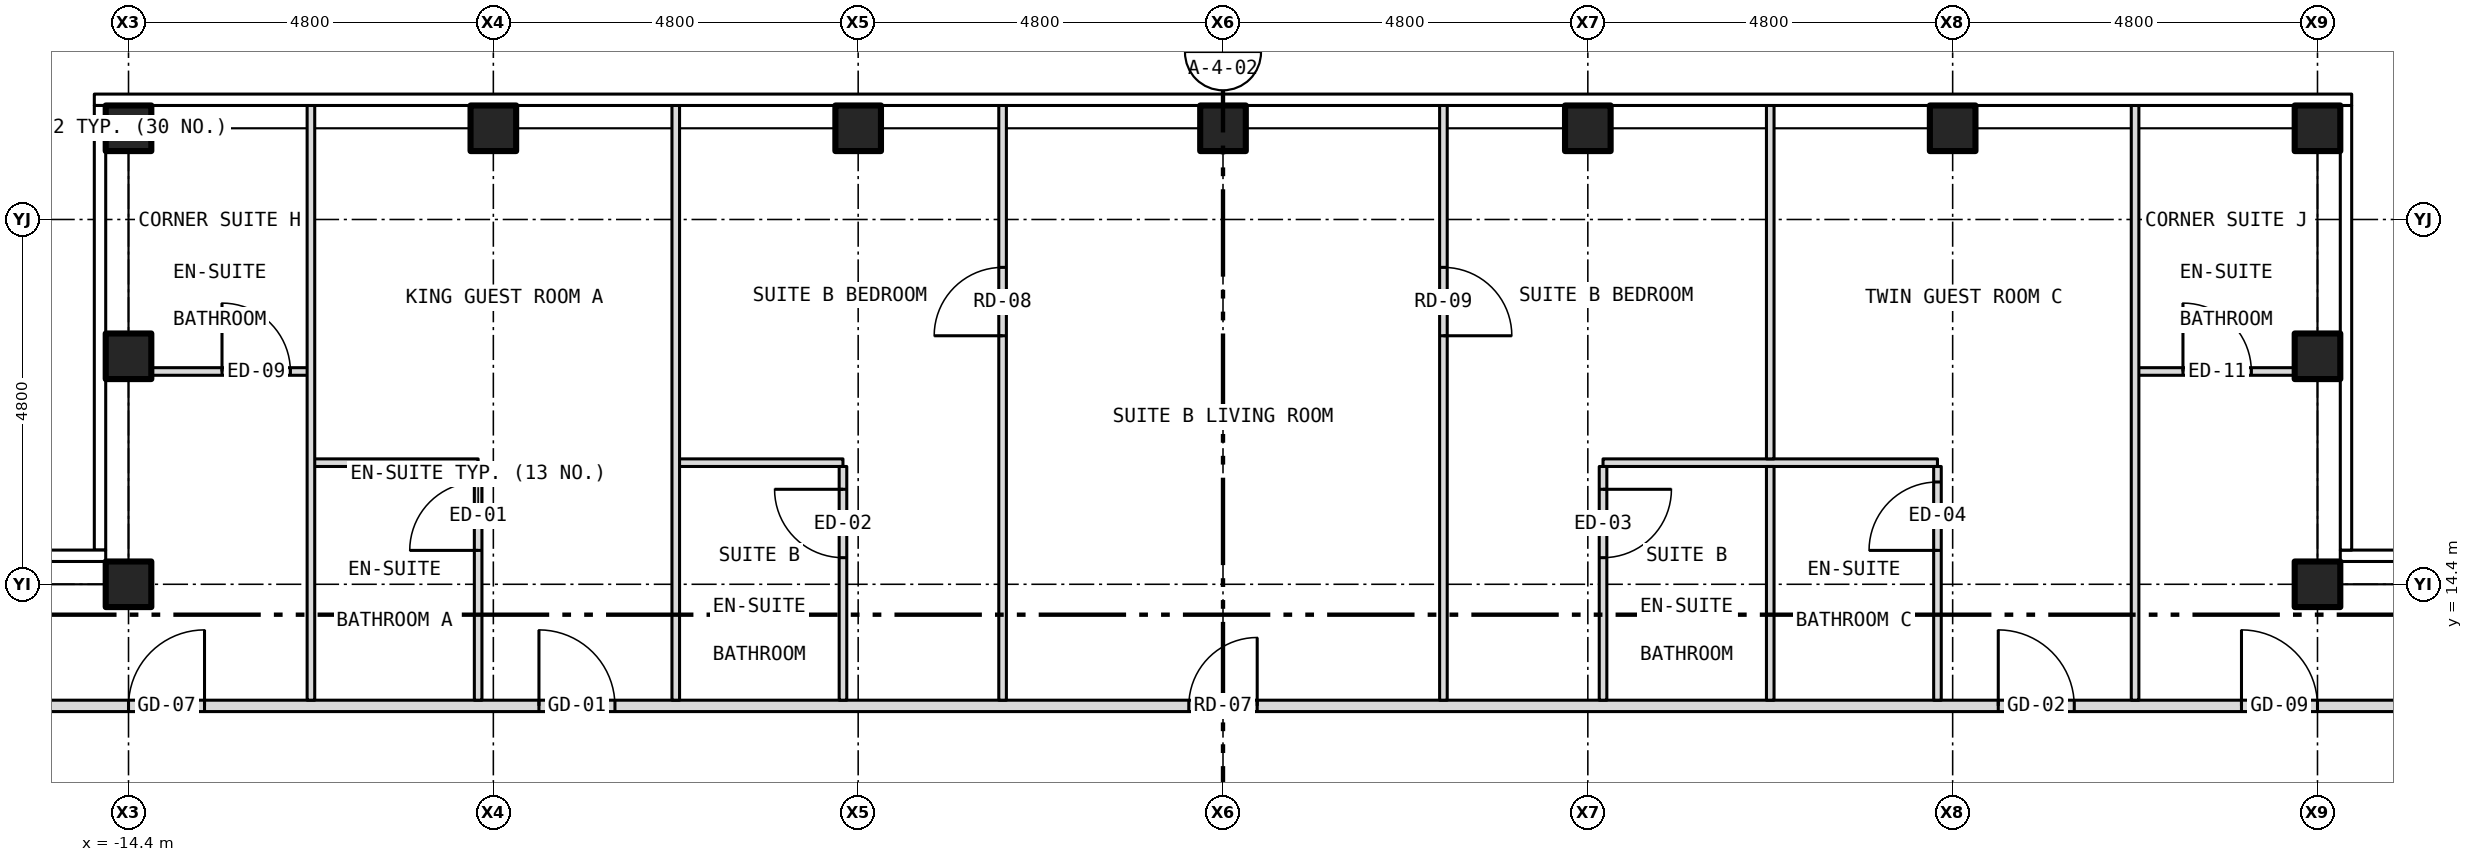
"""IFC4 building model, lengths in metres.
Left out: names, types, materials, properties, quantities, classifications, styles, units other than length and angle.
Written with IfcOpenShell. Run it as: python <this file> out.ifc"""

import sys

from ifc_helpers import new_model, si_unit, direction, frame, frame_2d, origin, origin_2d, place, context, subcontext, project, spatial, rectangle, hollow_rectangle, extrude, element, fill, save


model = new_model("IFC4")
c1 = context("Model", 3, precision=1e-05, world=origin(), true_north=direction((0.0, 1.0)))
c2 = subcontext(c1, "Body", "Model", "MODEL_VIEW")
j1 = project(units=[si_unit("LENGTHUNIT", "METRE"), si_unit("PLANEANGLEUNIT", "RADIAN")], contexts=[c1])
p1 = place(None, origin())
s1 = spatial("IfcSite", under=j1, at=p1, CompositionType="ELEMENT")
p2 = place(p1, origin())
s2 = spatial("IfcBuilding", under=s1, at=p2, CompositionType="ELEMENT")
p3 = place(p2, frame((0.0, 0.0, 248.0)))
s3 = spatial("IfcBuildingStorey", under=s2, at=p3, CompositionType="ELEMENT", Elevation=248.0)
for number, where, z_axis, x_axis in (
    (1, (-14.4, 20.4, -0.15), (0.0, 0.0, 1.0), (1.0, 0.0, 0.0)),
    (2, (-9.6, 20.4, -0.15), (0.0, 0.0, 1.0), (1.0, 0.0, 0.0)),
    (3, (-4.8, 20.4, -0.15), (0.0, 0.0, 1.0), (1.0, 0.0, 0.0)),
    (4, (0.0, 20.4, -0.15), (0.0, 0.0, 1.0), (1.0, 0.0, 0.0)),
    (5, (4.8, 20.4, -0.15), (0.0, 0.0, 1.0), (1.0, 0.0, 0.0)),
    (6, (9.6, 20.4, -0.15), (0.0, 0.0, 1.0), (1.0, 0.0, 0.0)),
    (7, (14.4, 20.4, -0.15), (0.0, 0.0, 1.0), (1.0, 0.0, 0.0)),
    (8, (-14.4, 14.4, -0.15), (0.0, 0.0, 1.0), (1.0, 0.0, 0.0)),
    (9, (-14.4, 17.4, -0.15), (0.0, 0.0, 1.0), (1.0, 0.0, 0.0)),
    (10, (14.4, 14.4, -0.15), (0.0, 0.0, 1.0), (1.0, 0.0, 0.0)),
    (11, (14.4, 17.4, -0.15), (0.0, 0.0, 1.0), (1.0, 0.0, 0.0)),
):
    element("IfcColumn", number, at=place(p3, frame(where, z_axis=z_axis, x_axis=x_axis)), inside=s3, PredefinedType="COLUMN", context=c2, shape_type="SweptSolid", body=[
        extrude(hollow_rectangle(XDim=0.6, YDim=0.6, WallThickness=0.03, at=origin_2d()), origin(), (0.0, 0.0, 1.0), 3.5),
    ])
p4 = place(p3, frame((-15.8, 12.8, 0.0), z_axis=(0.0, 0.0, 1.0), x_axis=(1.0, 0.0, 0.0)))
e12 = element("IfcWall", 12, at=p4, inside=s3, PredefinedType="PARTITIONING", context=c2, shape_type="SweptSolid", body=[
    extrude(rectangle(XDim=31.6, YDim=0.15, at=frame_2d((15.8, 0.0))), origin(), (0.0, 0.0, 1.0), 3.35),
])
p5 = place(p4, frame((6.8, 0.0, 0.0)))
e13 = element("IfcOpeningElement", 13, at=p5, cuts=e12, PredefinedType="OPENING", context=c2, shape_type="SweptSolid", body=[
    extrude(rectangle(XDim=1.0, YDim=2.1, at=frame_2d((0.5, 1.05))), frame((0.0, 0.087, 0.0), z_axis=(0.0, -1.0, 0.0), x_axis=(1.0, 0.0, 0.0)), (0.0, 0.0, 1.0), 0.174),
])
p6 = place(p4, frame((15.35, 0.0, 0.0)))
e14 = element("IfcOpeningElement", 14, at=p6, cuts=e12, PredefinedType="OPENING", context=c2, shape_type="SweptSolid", body=[
    extrude(rectangle(XDim=0.9, YDim=2.1, at=frame_2d((0.45, 1.05))), frame((0.0, 0.087, 0.0), z_axis=(0.0, -1.0, 0.0), x_axis=(1.0, 0.0, 0.0)), (0.0, 0.0, 1.0), 0.174),
])
p7 = place(p4, frame((26.0, 0.0, 0.0)))
e15 = element("IfcOpeningElement", 15, at=p7, cuts=e12, PredefinedType="OPENING", context=c2, shape_type="SweptSolid", body=[
    extrude(rectangle(XDim=1.0, YDim=2.1, at=frame_2d((0.5, 1.05))), frame((0.0, 0.087, 0.0), z_axis=(0.0, -1.0, 0.0), x_axis=(1.0, 0.0, 0.0)), (0.0, 0.0, 1.0), 0.174),
])
p8 = place(p4, frame((1.4, 0.0, 0.0)))
e16 = element("IfcOpeningElement", 16, at=p8, cuts=e12, PredefinedType="OPENING", context=c2, shape_type="SweptSolid", body=[
    extrude(rectangle(XDim=1.0, YDim=2.1, at=frame_2d((0.5, 1.05))), frame((0.0, 0.087, 0.0), z_axis=(0.0, -1.0, 0.0), x_axis=(1.0, 0.0, 0.0)), (0.0, 0.0, 1.0), 0.174),
])
p9 = place(p4, frame((29.2, 0.0, 0.0)))
e17 = element("IfcOpeningElement", 17, at=p9, cuts=e12, PredefinedType="OPENING", context=c2, shape_type="SweptSolid", body=[
    extrude(rectangle(XDim=1.0, YDim=2.1, at=frame_2d((0.5, 1.05))), frame((0.0, 0.087, 0.0), z_axis=(0.0, -1.0, 0.0), x_axis=(1.0, 0.0, 0.0)), (0.0, 0.0, 1.0), 0.174),
])
for number, where, z_axis, x_axis in (
    (18, (-12.0, 16.0, 0.0), (0.0, 0.0, 1.0), (1.0, 0.0, 0.0)),
    (19, (-7.2, 16.0, 0.0), (0.0, 0.0, 1.0), (1.0, 0.0, 0.0)),
):
    element("IfcWall", number, at=place(p3, frame(where, z_axis=z_axis, x_axis=x_axis)), inside=s3, PredefinedType="PARTITIONING", context=c2, shape_type="SweptSolid", body=[
        extrude(rectangle(XDim=2.2, YDim=0.1, at=frame_2d((1.1, 0.0))), origin(), (0.0, 0.0, 1.0), 3.35),
    ])
p10 = place(p3, frame((5.0, 16.0, 0.0), z_axis=(0.0, 0.0, 1.0), x_axis=(1.0, 0.0, 0.0)))
e20 = element("IfcWall", 20, at=p10, inside=s3, PredefinedType="PARTITIONING", context=c2, shape_type="SweptSolid", body=[
    extrude(rectangle(XDim=4.4, YDim=0.1, at=frame_2d((2.2, 0.0))), origin(), (0.0, 0.0, 1.0), 3.35),
])
p11 = place(p3, frame((-14.28, 17.2, 0.0), z_axis=(0.0, 0.0, 1.0), x_axis=(1.0, 0.0, 0.0)))
e21 = element("IfcWall", 21, at=p11, inside=s3, PredefinedType="PARTITIONING", context=c2, shape_type="SweptSolid", body=[
    extrude(rectangle(XDim=2.28, YDim=0.1, at=frame_2d((1.14, 0.0))), origin(), (0.0, 0.0, 1.0), 3.35),
])
p12 = place(p11, frame((1.11, 0.0, 0.0)))
e22 = element("IfcOpeningElement", 22, at=p12, cuts=e21, PredefinedType="OPENING", context=c2, shape_type="SweptSolid", body=[
    extrude(rectangle(XDim=0.9, YDim=2.1, at=frame_2d((0.45, 1.05))), frame((0.0, 0.062, 0.0), z_axis=(0.0, -1.0, 0.0), x_axis=(1.0, 0.0, 0.0)), (0.0, 0.0, 1.0), 0.124),
])
p13 = place(p3, frame((12.0, 17.2, 0.0), z_axis=(0.0, 0.0, 1.0), x_axis=(1.0, 0.0, 0.0)))
e23 = element("IfcWall", 23, at=p13, inside=s3, PredefinedType="PARTITIONING", context=c2, shape_type="SweptSolid", body=[
    extrude(rectangle(XDim=2.28, YDim=0.1, at=frame_2d((1.14, 0.0))), origin(), (0.0, 0.0, 1.0), 3.35),
])
p14 = place(p13, frame((0.63, 0.0, 0.0)))
e24 = element("IfcOpeningElement", 24, at=p14, cuts=e23, PredefinedType="OPENING", context=c2, shape_type="SweptSolid", body=[
    extrude(rectangle(XDim=0.9, YDim=2.1, at=frame_2d((0.45, 1.05))), frame((0.0, 0.062, 0.0), z_axis=(0.0, -1.0, 0.0), x_axis=(1.0, 0.0, 0.0)), (0.0, 0.0, 1.0), 0.124),
])
p15 = place(p3, frame((-12.0, 12.875, 0.0), z_axis=(0.0, 0.0, 1.0), x_axis=(0.0, 1.0, 0.0)))
e25 = element("IfcWall", 25, at=p15, inside=s3, PredefinedType="PARTITIONING", context=c2, shape_type="SweptSolid", body=[
    extrude(rectangle(XDim=7.855, YDim=0.1, at=frame_2d((3.927, 0.0))), origin(), (0.0, 0.0, 1.0), 3.35),
])
p16 = place(p3, frame((-9.8, 12.875, 0.0), z_axis=(0.0, 0.0, 1.0), x_axis=(0.0, 1.0, 0.0)))
e26 = element("IfcWall", 26, at=p16, inside=s3, PredefinedType="PARTITIONING", context=c2, shape_type="SweptSolid", body=[
    extrude(rectangle(XDim=3.075, YDim=0.1, at=frame_2d((1.538, 0.0))), origin(), (0.0, 0.0, 1.0), 2.728),
])
p17 = place(p16, frame((1.971, 0.0, 0.0)))
e27 = element("IfcOpeningElement", 27, at=p17, cuts=e26, PredefinedType="OPENING", context=c2, shape_type="SweptSolid", body=[
    extrude(rectangle(XDim=0.9, YDim=2.1, at=frame_2d((0.45, 1.05))), frame((0.0, 0.062, 0.0), z_axis=(0.0, -1.0, 0.0), x_axis=(1.0, 0.0, 0.0)), (0.0, 0.0, 1.0), 0.124),
])
p18 = place(p3, frame((-7.2, 12.875, 0.0), z_axis=(0.0, 0.0, 1.0), x_axis=(0.0, 1.0, 0.0)))
e28 = element("IfcWall", 28, at=p18, inside=s3, PredefinedType="PARTITIONING", context=c2, shape_type="SweptSolid", body=[
    extrude(rectangle(XDim=7.855, YDim=0.1, at=frame_2d((3.927, 0.0))), origin(), (0.0, 0.0, 1.0), 3.35),
])
p19 = place(p3, frame((-5.0, 12.875, 0.0), z_axis=(0.0, 0.0, 1.0), x_axis=(0.0, 1.0, 0.0)))
e29 = element("IfcWall", 29, at=p19, inside=s3, PredefinedType="PARTITIONING", context=c2, shape_type="SweptSolid", body=[
    extrude(rectangle(XDim=3.075, YDim=0.1, at=frame_2d((1.538, 0.0))), origin(), (0.0, 0.0, 1.0), 3.35),
])
p20 = place(p19, frame((1.875, 0.0, 0.0)))
e30 = element("IfcOpeningElement", 30, at=p20, cuts=e29, PredefinedType="OPENING", context=c2, shape_type="SweptSolid", body=[
    extrude(rectangle(XDim=0.9, YDim=2.1, at=frame_2d((0.45, 1.05))), frame((0.0, 0.062, 0.0), z_axis=(0.0, -1.0, 0.0), x_axis=(1.0, 0.0, 0.0)), (0.0, 0.0, 1.0), 0.124),
])
p21 = place(p3, frame((-2.9, 12.875, 0.0), z_axis=(0.0, 0.0, 1.0), x_axis=(0.0, 1.0, 0.0)))
e31 = element("IfcWall", 31, at=p21, inside=s3, PredefinedType="PARTITIONING", context=c2, shape_type="SweptSolid", body=[
    extrude(rectangle(XDim=7.855, YDim=0.1, at=frame_2d((3.927, 0.0))), origin(), (0.0, 0.0, 1.0), 3.35),
])
p22 = place(p21, frame((4.795, 0.0, 0.0)))
e32 = element("IfcOpeningElement", 32, at=p22, cuts=e31, PredefinedType="OPENING", context=c2, shape_type="SweptSolid", body=[
    extrude(rectangle(XDim=0.9, YDim=2.1, at=frame_2d((0.45, 1.05))), frame((0.0, 0.062, 0.0), z_axis=(0.0, -1.0, 0.0), x_axis=(1.0, 0.0, 0.0)), (0.0, 0.0, 1.0), 0.124),
])
p23 = place(p3, frame((2.9, 12.875, 0.0), z_axis=(0.0, 0.0, 1.0), x_axis=(0.0, 1.0, 0.0)))
e33 = element("IfcWall", 33, at=p23, inside=s3, PredefinedType="PARTITIONING", context=c2, shape_type="SweptSolid", body=[
    extrude(rectangle(XDim=7.855, YDim=0.1, at=frame_2d((3.927, 0.0))), origin(), (0.0, 0.0, 1.0), 3.35),
])
p24 = place(p23, frame((4.795, 0.0, 0.0)))
e34 = element("IfcOpeningElement", 34, at=p24, cuts=e33, PredefinedType="OPENING", context=c2, shape_type="SweptSolid", body=[
    extrude(rectangle(XDim=0.9, YDim=2.1, at=frame_2d((0.45, 1.05))), frame((0.0, 0.062, 0.0), z_axis=(0.0, -1.0, 0.0), x_axis=(1.0, 0.0, 0.0)), (0.0, 0.0, 1.0), 0.124),
])
p25 = place(p3, frame((5.0, 12.875, 0.0), z_axis=(0.0, 0.0, 1.0), x_axis=(0.0, 1.0, 0.0)))
e35 = element("IfcWall", 35, at=p25, inside=s3, PredefinedType="PARTITIONING", context=c2, shape_type="SweptSolid", body=[
    extrude(rectangle(XDim=3.075, YDim=0.1, at=frame_2d((1.538, 0.0))), origin(), (0.0, 0.0, 1.0), 3.35),
])
p26 = place(p25, frame((1.875, 0.0, 0.0)))
e36 = element("IfcOpeningElement", 36, at=p26, cuts=e35, PredefinedType="OPENING", context=c2, shape_type="SweptSolid", body=[
    extrude(rectangle(XDim=0.9, YDim=2.1, at=frame_2d((0.45, 1.05))), frame((0.0, 0.062, 0.0), z_axis=(0.0, -1.0, 0.0), x_axis=(1.0, 0.0, 0.0)), (0.0, 0.0, 1.0), 0.124),
])
p27 = place(p3, frame((7.2, 12.875, 0.0), z_axis=(0.0, 0.0, 1.0), x_axis=(0.0, 1.0, 0.0)))
e37 = element("IfcWall", 37, at=p27, inside=s3, PredefinedType="PARTITIONING", context=c2, shape_type="SweptSolid", body=[
    extrude(rectangle(XDim=3.075, YDim=0.1, at=frame_2d((1.538, 0.0))), origin(), (0.0, 0.0, 1.0), 3.35),
])
p28 = place(p3, frame((7.2, 16.05, 0.0), z_axis=(0.0, 0.0, 1.0), x_axis=(0.0, 1.0, 0.0)))
e38 = element("IfcWall", 38, at=p28, inside=s3, PredefinedType="PARTITIONING", context=c2, shape_type="SweptSolid", body=[
    extrude(rectangle(XDim=4.68, YDim=0.1, at=frame_2d((2.34, 0.0))), origin(), (0.0, 0.0, 1.0), 3.35),
])
p29 = place(p3, frame((9.4, 12.875, 0.0), z_axis=(0.0, 0.0, 1.0), x_axis=(0.0, 1.0, 0.0)))
e39 = element("IfcWall", 39, at=p29, inside=s3, PredefinedType="PARTITIONING", context=c2, shape_type="SweptSolid", body=[
    extrude(rectangle(XDim=3.075, YDim=0.1, at=frame_2d((1.538, 0.0))), origin(), (0.0, 0.0, 1.0), 2.728),
])
p30 = place(p29, frame((1.971, 0.0, 0.0)))
e40 = element("IfcOpeningElement", 40, at=p30, cuts=e39, PredefinedType="OPENING", context=c2, shape_type="SweptSolid", body=[
    extrude(rectangle(XDim=0.9, YDim=2.1, at=frame_2d((0.45, 1.05))), frame((0.0, 0.062, 0.0), z_axis=(0.0, -1.0, 0.0), x_axis=(1.0, 0.0, 0.0)), (0.0, 0.0, 1.0), 0.124),
])
p31 = place(p3, frame((12.0, 12.875, 0.0), z_axis=(0.0, 0.0, 1.0), x_axis=(0.0, 1.0, 0.0)))
e41 = element("IfcWall", 41, at=p31, inside=s3, PredefinedType="PARTITIONING", context=c2, shape_type="SweptSolid", body=[
    extrude(rectangle(XDim=7.855, YDim=0.1, at=frame_2d((3.927, 0.0))), origin(), (0.0, 0.0, 1.0), 3.35),
])
p32 = place(p5, origin())
e42 = element("IfcDoor", 42, at=p32, inside=s3, OperationType="SINGLE_SWING_LEFT", PredefinedType="DOOR", context=c2, shape_type="SweptSolid", body=[
    extrude(rectangle(XDim=1.0, YDim=2.1, at=frame_2d((0.5, 1.05))), frame((0.0, 0.025, 0.0), z_axis=(0.0, -1.0, 0.0), x_axis=(1.0, 0.0, 0.0)), (0.0, 0.0, 1.0), 0.05),
])
fill(e13, e42)
p33 = place(p17, origin())
e43 = element("IfcDoor", 43, at=p33, inside=s3, OperationType="SINGLE_SWING_LEFT", PredefinedType="DOOR", context=c2, shape_type="SweptSolid", body=[
    extrude(rectangle(XDim=0.9, YDim=2.1, at=frame_2d((0.45, 1.05))), frame((0.0, 0.025, 0.0), z_axis=(0.0, -1.0, 0.0), x_axis=(1.0, 0.0, 0.0)), (0.0, 0.0, 1.0), 0.05),
])
fill(e27, e43)
p34 = place(p6, origin())
e44 = element("IfcDoor", 44, at=p34, inside=s3, OperationType="SINGLE_SWING_RIGHT", PredefinedType="DOOR", context=c2, shape_type="SweptSolid", body=[
    extrude(rectangle(XDim=0.9, YDim=2.1, at=frame_2d((0.45, 1.05))), frame((0.0, 0.025, 0.0), z_axis=(0.0, -1.0, 0.0), x_axis=(1.0, 0.0, 0.0)), (0.0, 0.0, 1.0), 0.05),
])
fill(e14, e44)
p35 = place(p22, origin())
e45 = element("IfcDoor", 45, at=p35, inside=s3, OperationType="SINGLE_SWING_LEFT", PredefinedType="DOOR", context=c2, shape_type="SweptSolid", body=[
    extrude(rectangle(XDim=0.9, YDim=2.1, at=frame_2d((0.45, 1.05))), frame((0.0, 0.025, 0.0), z_axis=(0.0, -1.0, 0.0), x_axis=(1.0, 0.0, 0.0)), (0.0, 0.0, 1.0), 0.05),
])
fill(e32, e45)
p36 = place(p20, origin())
e46 = element("IfcDoor", 46, at=p36, inside=s3, OperationType="SINGLE_SWING_RIGHT", PredefinedType="DOOR", context=c2, shape_type="SweptSolid", body=[
    extrude(rectangle(XDim=0.9, YDim=2.1, at=frame_2d((0.45, 1.05))), frame((0.0, 0.025, 0.0), z_axis=(0.0, -1.0, 0.0), x_axis=(1.0, 0.0, 0.0)), (0.0, 0.0, 1.0), 0.05),
])
fill(e30, e46)
p37 = place(p24, origin())
e47 = element("IfcDoor", 47, at=p37, inside=s3, OperationType="SINGLE_SWING_LEFT", PredefinedType="DOOR", context=c2, shape_type="SweptSolid", body=[
    extrude(rectangle(XDim=0.9, YDim=2.1, at=frame_2d((0.45, 1.05))), frame((0.0, 0.025, 0.0), z_axis=(0.0, -1.0, 0.0), x_axis=(1.0, 0.0, 0.0)), (0.0, 0.0, 1.0), 0.05),
])
fill(e34, e47)
p38 = place(p26, origin())
e48 = element("IfcDoor", 48, at=p38, inside=s3, OperationType="SINGLE_SWING_RIGHT", PredefinedType="DOOR", context=c2, shape_type="SweptSolid", body=[
    extrude(rectangle(XDim=0.9, YDim=2.1, at=frame_2d((0.45, 1.05))), frame((0.0, 0.025, 0.0), z_axis=(0.0, -1.0, 0.0), x_axis=(1.0, 0.0, 0.0)), (0.0, 0.0, 1.0), 0.05),
])
fill(e36, e48)
p39 = place(p7, origin())
e49 = element("IfcDoor", 49, at=p39, inside=s3, OperationType="SINGLE_SWING_LEFT", PredefinedType="DOOR", context=c2, shape_type="SweptSolid", body=[
    extrude(rectangle(XDim=1.0, YDim=2.1, at=frame_2d((0.5, 1.05))), frame((0.0, 0.025, 0.0), z_axis=(0.0, -1.0, 0.0), x_axis=(1.0, 0.0, 0.0)), (0.0, 0.0, 1.0), 0.05),
])
fill(e15, e49)
p40 = place(p30, origin())
e50 = element("IfcDoor", 50, at=p40, inside=s3, OperationType="SINGLE_SWING_LEFT", PredefinedType="DOOR", context=c2, shape_type="SweptSolid", body=[
    extrude(rectangle(XDim=0.9, YDim=2.1, at=frame_2d((0.45, 1.05))), frame((0.0, 0.025, 0.0), z_axis=(0.0, -1.0, 0.0), x_axis=(1.0, 0.0, 0.0)), (0.0, 0.0, 1.0), 0.05),
])
fill(e40, e50)
p41 = place(p12, origin())
e51 = element("IfcDoor", 51, at=p41, inside=s3, OperationType="SINGLE_SWING_LEFT", PredefinedType="DOOR", context=c2, shape_type="SweptSolid", body=[
    extrude(rectangle(XDim=0.9, YDim=2.1, at=frame_2d((0.45, 1.05))), frame((0.0, 0.025, 0.0), z_axis=(0.0, -1.0, 0.0), x_axis=(1.0, 0.0, 0.0)), (0.0, 0.0, 1.0), 0.05),
])
fill(e22, e51)
p42 = place(p8, origin())
e52 = element("IfcDoor", 52, at=p42, inside=s3, OperationType="SINGLE_SWING_RIGHT", PredefinedType="DOOR", context=c2, shape_type="SweptSolid", body=[
    extrude(rectangle(XDim=1.0, YDim=2.1, at=frame_2d((0.5, 1.05))), frame((0.0, 0.025, 0.0), z_axis=(0.0, -1.0, 0.0), x_axis=(1.0, 0.0, 0.0)), (0.0, 0.0, 1.0), 0.05),
])
fill(e16, e52)
p43 = place(p14, origin())
e53 = element("IfcDoor", 53, at=p43, inside=s3, OperationType="SINGLE_SWING_LEFT", PredefinedType="DOOR", context=c2, shape_type="SweptSolid", body=[
    extrude(rectangle(XDim=0.9, YDim=2.1, at=frame_2d((0.45, 1.05))), frame((0.0, 0.025, 0.0), z_axis=(0.0, -1.0, 0.0), x_axis=(1.0, 0.0, 0.0)), (0.0, 0.0, 1.0), 0.05),
])
fill(e24, e53)
p44 = place(p9, origin())
e54 = element("IfcDoor", 54, at=p44, inside=s3, OperationType="SINGLE_SWING_LEFT", PredefinedType="DOOR", context=c2, shape_type="SweptSolid", body=[
    extrude(rectangle(XDim=1.0, YDim=2.1, at=frame_2d((0.5, 1.05))), frame((0.0, 0.025, 0.0), z_axis=(0.0, -1.0, 0.0), x_axis=(1.0, 0.0, 0.0)), (0.0, 0.0, 1.0), 0.05),
])
fill(e17, e54)
save(model, sys.argv[1])
